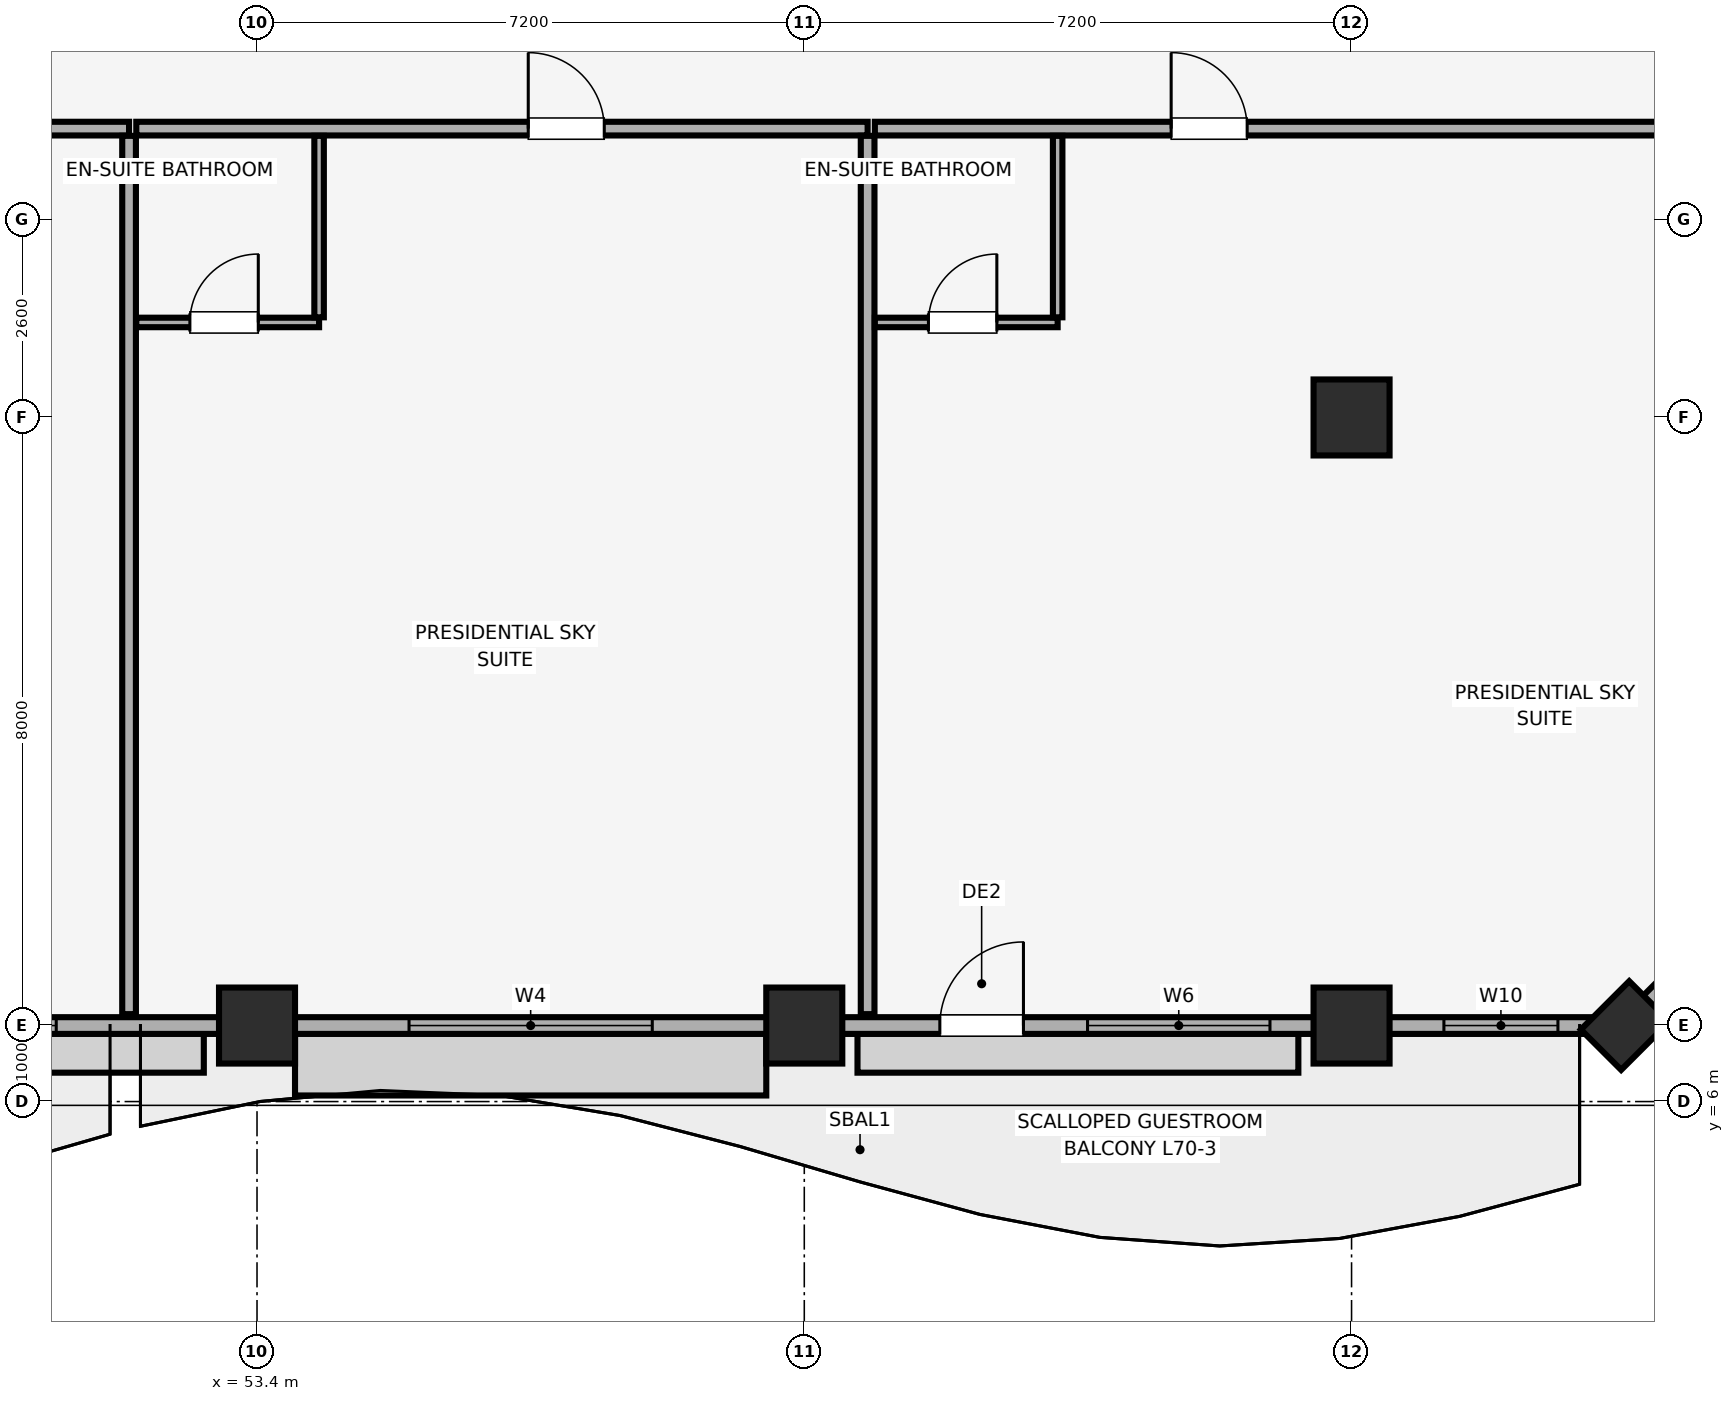
"""IFC4 building model, lengths in metres.
Left out: names, types, materials, properties, quantities, classifications, styles, units other than length and angle.
Written with IfcOpenShell. Run it as: python <this file> out.ifc"""

import sys

from ifc_helpers import new_model, si_unit, direction, frame, frame_2d, origin, origin_2d, place, context, subcontext, project, spatial, rectangle, extrude, element, fill, save


model = new_model("IFC4")
c1 = context("Model", 3, precision=1e-05, world=origin(), true_north=direction((0.0, 1.0)))
c2 = subcontext(c1, "Body", "Model", "MODEL_VIEW")
j1 = project(units=[si_unit("LENGTHUNIT", "METRE"), si_unit("PLANEANGLEUNIT", "RADIAN")], contexts=[c1])
p1 = place(None, origin())
s1 = spatial("IfcSite", under=j1, at=p1, CompositionType="ELEMENT")
p2 = place(p1, origin())
s2 = spatial("IfcBuilding", under=s1, at=p2, CompositionType="ELEMENT")
p3 = place(p2, frame((0.0, 0.0, 285.9)))
s3 = spatial("IfcBuildingStorey", under=s2, at=p3, CompositionType="ELEMENT", Elevation=285.9)
for number, where, z_axis, x_axis in (
    (1, (53.4, 7.0, 0.0), (0.0, 0.0, 1.0), (1.0, 0.0, 0.0)),
    (2, (60.6, 7.0, 0.0), (0.0, 0.0, 1.0), (1.0, 0.0, 0.0)),
    (3, (67.8, 7.0, 0.0), (0.0, 0.0, 1.0), (1.0, 0.0, 0.0)),
):
    element("IfcColumn", number, at=place(p3, frame(where, z_axis=z_axis, x_axis=x_axis)), inside=s3, PredefinedType="COLUMN", context=c2, shape_type="SweptSolid", body=[
        extrude(rectangle(XDim=1.0, YDim=1.0, at=origin_2d()), origin(), (0.0, 0.0, 1.0), 4.1),
    ])
p4 = place(p3, frame((71.4, 7.0, 0.0), z_axis=(0.0, 0.0, 1.0), x_axis=(0.707106781187, 0.707106781187, 0.0)))
e4 = element("IfcColumn", 4, at=p4, inside=s3, PredefinedType="PILASTER", context=c2, shape_type="SweptSolid", body=[
    extrude(rectangle(XDim=0.9, YDim=0.75, at=origin_2d()), origin(), (0.0, 0.0, 1.0), 4.1),
])
p5 = place(p3, frame((67.8, 15.0, 0.0), z_axis=(0.0, 0.0, 1.0), x_axis=(1.0, 0.0, 0.0)))
e5 = element("IfcColumn", 5, at=p5, inside=s3, PredefinedType="COLUMN", context=c2, shape_type="SweptSolid", body=[
    extrude(rectangle(XDim=1.0, YDim=1.0, at=origin_2d()), origin(), (0.0, 0.0, 1.0), 4.1),
])
p6 = place(p3, frame((12.6, 7.0, 0.0), z_axis=(0.0, 0.0, 1.0), x_axis=(1.0, 0.0, 0.0)))
e6 = element("IfcWall", 6, at=p6, inside=s3, PredefinedType="SOLIDWALL", context=c2, shape_type="SweptSolid", body=[
    extrude(rectangle(XDim=58.8, YDim=0.22, at=frame_2d((29.4, 0.0))), origin(), (0.0, 0.0, 1.0), 3.3),
])
p7 = place(p6, frame((7.917, 0.0, 0.0)))
e7 = element("IfcOpeningElement", 7, at=p7, cuts=e6, PredefinedType="OPENING", context=c2, shape_type="SweptSolid", body=[
    extrude(rectangle(XDim=1.1, YDim=2.15, at=frame_2d((0.55, 1.075))), frame((0.0, 0.12, 0.0), z_axis=(0.0, -1.0, 0.0), x_axis=(1.0, 0.0, 0.0)), (0.0, 0.0, 1.0), 0.24),
])
p8 = place(p6, frame((22.583, 0.0, 0.0)))
e8 = element("IfcOpeningElement", 8, at=p8, cuts=e6, PredefinedType="OPENING", context=c2, shape_type="SweptSolid", body=[
    extrude(rectangle(XDim=1.1, YDim=2.15, at=frame_2d((0.55, 1.075))), frame((0.0, 0.12, 0.0), z_axis=(0.0, -1.0, 0.0), x_axis=(1.0, 0.0, 0.0)), (0.0, 0.0, 1.0), 0.24),
])
p9 = place(p6, frame((49.783, 0.0, 0.0)))
e9 = element("IfcOpeningElement", 9, at=p9, cuts=e6, PredefinedType="OPENING", context=c2, shape_type="SweptSolid", body=[
    extrude(rectangle(XDim=1.1, YDim=2.15, at=frame_2d((0.55, 1.075))), frame((0.0, 0.12, 0.0), z_axis=(0.0, -1.0, 0.0), x_axis=(1.0, 0.0, 0.0)), (0.0, 0.0, 1.0), 0.24),
])
p10 = place(p6, frame((0.885, 0.0, 0.85)))
e10 = element("IfcOpeningElement", 10, at=p10, cuts=e6, PredefinedType="OPENING", context=c2, shape_type="SweptSolid", body=[
    extrude(rectangle(XDim=1.5, YDim=1.4, at=frame_2d((0.75, 0.7))), frame((0.0, 0.12, 0.0), z_axis=(0.0, -1.0, 0.0), x_axis=(1.0, 0.0, 0.0)), (0.0, 0.0, 1.0), 0.24),
])
p11 = place(p6, frame((4.673, 0.0, 0.85)))
e11 = element("IfcOpeningElement", 11, at=p11, cuts=e6, PredefinedType="OPENING", context=c2, shape_type="SweptSolid", body=[
    extrude(rectangle(XDim=2.4, YDim=1.5, at=frame_2d((1.2, 0.75))), frame((0.0, 0.12, 0.0), z_axis=(0.0, -1.0, 0.0), x_axis=(1.0, 0.0, 0.0)), (0.0, 0.0, 1.0), 0.24),
])
p12 = place(p6, frame((12.8, 0.0, 0.85)))
e12 = element("IfcOpeningElement", 12, at=p12, cuts=e6, PredefinedType="OPENING", context=c2, shape_type="SweptSolid", body=[
    extrude(rectangle(XDim=3.2, YDim=1.85, at=frame_2d((1.6, 0.925))), frame((0.0, 0.12, 0.0), z_axis=(0.0, -1.0, 0.0), x_axis=(1.0, 0.0, 0.0)), (0.0, 0.0, 1.0), 0.24),
])
p13 = place(p6, frame((20.298, 0.0, 0.85)))
e13 = element("IfcOpeningElement", 13, at=p13, cuts=e6, PredefinedType="OPENING", context=c2, shape_type="SweptSolid", body=[
    extrude(rectangle(XDim=1.5, YDim=1.4, at=frame_2d((0.75, 0.7))), frame((0.0, 0.12, 0.0), z_axis=(0.0, -1.0, 0.0), x_axis=(1.0, 0.0, 0.0)), (0.0, 0.0, 1.0), 0.24),
])
p14 = place(p6, frame((26.3, 0.0, 0.85)))
e14 = element("IfcOpeningElement", 14, at=p14, cuts=e6, PredefinedType="OPENING", context=c2, shape_type="SweptSolid", body=[
    extrude(rectangle(XDim=2.4, YDim=1.5, at=frame_2d((1.2, 0.75))), frame((0.0, 0.12, 0.0), z_axis=(0.0, -1.0, 0.0), x_axis=(1.0, 0.0, 0.0)), (0.0, 0.0, 1.0), 0.24),
])
p15 = place(p6, frame((30.1, 0.0, 0.85)))
e15 = element("IfcOpeningElement", 15, at=p15, cuts=e6, PredefinedType="OPENING", context=c2, shape_type="SweptSolid", body=[
    extrude(rectangle(XDim=2.4, YDim=1.5, at=frame_2d((1.2, 0.75))), frame((0.0, 0.12, 0.0), z_axis=(0.0, -1.0, 0.0), x_axis=(1.0, 0.0, 0.0)), (0.0, 0.0, 1.0), 0.24),
])
p16 = place(p6, frame((34.958, 0.0, 0.85)))
e16 = element("IfcOpeningElement", 16, at=p16, cuts=e6, PredefinedType="OPENING", context=c2, shape_type="SweptSolid", body=[
    extrude(rectangle(XDim=3.2, YDim=1.85, at=frame_2d((1.6, 0.925))), frame((0.0, 0.12, 0.0), z_axis=(0.0, -1.0, 0.0), x_axis=(1.0, 0.0, 0.0)), (0.0, 0.0, 1.0), 0.24),
])
p17 = place(p6, frame((42.8, 0.0, 0.85)))
e17 = element("IfcOpeningElement", 17, at=p17, cuts=e6, PredefinedType="OPENING", context=c2, shape_type="SweptSolid", body=[
    extrude(rectangle(XDim=3.2, YDim=1.85, at=frame_2d((1.6, 0.925))), frame((0.0, 0.12, 0.0), z_axis=(0.0, -1.0, 0.0), x_axis=(1.0, 0.0, 0.0)), (0.0, 0.0, 1.0), 0.24),
])
p18 = place(p6, frame((51.727, 0.0, 0.85)))
e18 = element("IfcOpeningElement", 18, at=p18, cuts=e6, PredefinedType="OPENING", context=c2, shape_type="SweptSolid", body=[
    extrude(rectangle(XDim=2.4, YDim=1.5, at=frame_2d((1.2, 0.75))), frame((0.0, 0.12, 0.0), z_axis=(0.0, -1.0, 0.0), x_axis=(1.0, 0.0, 0.0)), (0.0, 0.0, 1.0), 0.24),
])
p19 = place(p6, frame((56.415, 0.0, 0.85)))
e19 = element("IfcOpeningElement", 19, at=p19, cuts=e6, PredefinedType="OPENING", context=c2, shape_type="SweptSolid", body=[
    extrude(rectangle(XDim=1.5, YDim=1.4, at=frame_2d((0.75, 0.7))), frame((0.0, 0.12, 0.0), z_axis=(0.0, -1.0, 0.0), x_axis=(1.0, 0.0, 0.0)), (0.0, 0.0, 1.0), 0.24),
])
p20 = place(p3, frame((71.4, 7.0, 0.0), z_axis=(0.0, 0.0, 1.0), x_axis=(0.707106781187, 0.707106781187, 0.0)))
e20 = element("IfcWall", 20, at=p20, inside=s3, PredefinedType="SOLIDWALL", context=c2, shape_type="SweptSolid", body=[
    extrude(rectangle(XDim=5.091, YDim=0.22, at=frame_2d((2.546, 0.0))), origin(), (0.0, 0.0, 1.0), 3.3),
])
p21 = place(p20, frame((1.496, 0.0, 0.85)))
e21 = element("IfcOpeningElement", 21, at=p21, cuts=e20, PredefinedType="OPENING", context=c2, shape_type="SweptSolid", body=[
    extrude(rectangle(XDim=2.1, YDim=1.6, at=frame_2d((1.05, 0.8))), frame((0.0, 0.12, 0.0), z_axis=(0.0, -1.0, 0.0), x_axis=(1.0, 0.0, 0.0)), (0.0, 0.0, 1.0), 0.24),
])
p22 = place(p3, frame((42.095, 18.8, 0.0), z_axis=(0.0, 0.0, 1.0), x_axis=(1.0, 0.0, 0.0)))
e22 = element("IfcWall", 22, at=p22, inside=s3, PredefinedType="PARTITIONING", context=c2, shape_type="SweptSolid", body=[
    extrude(rectangle(XDim=9.622, YDim=0.18, at=frame_2d((4.811, 0.0))), origin(), (0.0, 0.0, 1.0), 4.1),
])
p23 = place(p22, frame((6.753, 0.0, 0.0)))
e23 = element("IfcOpeningElement", 23, at=p23, cuts=e22, PredefinedType="OPENING", context=c2, shape_type="SweptSolid", body=[
    extrude(rectangle(XDim=1.0, YDim=2.15, at=frame_2d((0.5, 1.075))), frame((0.0, 0.1, 0.0), z_axis=(0.0, -1.0, 0.0), x_axis=(1.0, 0.0, 0.0)), (0.0, 0.0, 1.0), 0.2),
])
p24 = place(p3, frame((51.717, 7.15, 0.0), z_axis=(0.0, 0.0, 1.0), x_axis=(0.0, 1.0, 0.0)))
e24 = element("IfcWall", 24, at=p24, inside=s3, PredefinedType="PARTITIONING", context=c2, shape_type="SweptSolid", body=[
    extrude(rectangle(XDim=11.555, YDim=0.18, at=frame_2d((5.778, 0.0))), origin(), (0.0, 0.0, 1.0), 4.1),
])
p25 = place(p3, frame((51.812, 18.8, 0.0), z_axis=(0.0, 0.0, 1.0), x_axis=(1.0, 0.0, 0.0)))
e25 = element("IfcWall", 25, at=p25, inside=s3, PredefinedType="PARTITIONING", context=c2, shape_type="SweptSolid", body=[
    extrude(rectangle(XDim=9.622, YDim=0.18, at=frame_2d((4.811, 0.0))), origin(), (0.0, 0.0, 1.0), 4.1),
])
p26 = place(p25, frame((5.157, 0.0, 0.0)))
e26 = element("IfcOpeningElement", 26, at=p26, cuts=e25, PredefinedType="OPENING", context=c2, shape_type="SweptSolid", body=[
    extrude(rectangle(XDim=1.0, YDim=2.15, at=frame_2d((0.5, 1.075))), frame((0.0, 0.1, 0.0), z_axis=(0.0, -1.0, 0.0), x_axis=(1.0, 0.0, 0.0)), (0.0, 0.0, 1.0), 0.2),
])
p27 = place(p3, frame((61.433, 7.15, 0.0), z_axis=(0.0, 0.0, 1.0), x_axis=(0.0, 1.0, 0.0)))
e27 = element("IfcWall", 27, at=p27, inside=s3, PredefinedType="PARTITIONING", context=c2, shape_type="SweptSolid", body=[
    extrude(rectangle(XDim=11.555, YDim=0.18, at=frame_2d((5.778, 0.0))), origin(), (0.0, 0.0, 1.0), 3.53),
])
p28 = place(p3, frame((51.812, 16.25, 0.0), z_axis=(0.0, 0.0, 1.0), x_axis=(1.0, 0.0, 0.0)))
e28 = element("IfcWall", 28, at=p28, inside=s3, PredefinedType="PARTITIONING", context=c2, shape_type="SweptSolid", body=[
    extrude(rectangle(XDim=2.405, YDim=0.125, at=frame_2d((1.203, 0.0))), origin(), (0.0, 0.0, 1.0), 4.1),
])
p29 = place(p28, frame((0.705, 0.0, 0.0)))
e29 = element("IfcOpeningElement", 29, at=p29, cuts=e28, PredefinedType="OPENING", context=c2, shape_type="SweptSolid", body=[
    extrude(rectangle(XDim=0.9, YDim=2.1, at=frame_2d((0.45, 1.05))), frame((0.0, 0.073, 0.0), z_axis=(0.0, -1.0, 0.0), x_axis=(1.0, 0.0, 0.0)), (0.0, 0.0, 1.0), 0.145),
])
p30 = place(p3, frame((54.217, 16.317, 0.0), z_axis=(0.0, 0.0, 1.0), x_axis=(0.0, 1.0, 0.0)))
e30 = element("IfcWall", 30, at=p30, inside=s3, PredefinedType="PARTITIONING", context=c2, shape_type="SweptSolid", body=[
    extrude(rectangle(XDim=2.388, YDim=0.125, at=frame_2d((1.194, 0.0))), origin(), (0.0, 0.0, 1.0), 4.1),
])
p31 = place(p3, frame((61.528, 18.8, 0.0), z_axis=(0.0, 0.0, 1.0), x_axis=(1.0, 0.0, 0.0)))
e31 = element("IfcWall", 31, at=p31, inside=s3, PredefinedType="PARTITIONING", context=c2, shape_type="SweptSolid", body=[
    extrude(rectangle(XDim=13.322, YDim=0.18, at=frame_2d((6.661, 0.0))), origin(), (0.0, 0.0, 1.0), 4.1),
])
p32 = place(p31, frame((3.898, 0.0, 0.0)))
e32 = element("IfcOpeningElement", 32, at=p32, cuts=e31, PredefinedType="OPENING", context=c2, shape_type="SweptSolid", body=[
    extrude(rectangle(XDim=1.0, YDim=2.15, at=frame_2d((0.5, 1.075))), frame((0.0, 0.1, 0.0), z_axis=(0.0, -1.0, 0.0), x_axis=(1.0, 0.0, 0.0)), (0.0, 0.0, 1.0), 0.2),
])
p33 = place(p3, frame((61.528, 16.25, 0.0), z_axis=(0.0, 0.0, 1.0), x_axis=(1.0, 0.0, 0.0)))
e33 = element("IfcWall", 33, at=p33, inside=s3, PredefinedType="PARTITIONING", context=c2, shape_type="SweptSolid", body=[
    extrude(rectangle(XDim=2.405, YDim=0.125, at=frame_2d((1.203, 0.0))), origin(), (0.0, 0.0, 1.0), 4.1),
])
p34 = place(p33, frame((0.705, 0.0, 0.0)))
e34 = element("IfcOpeningElement", 34, at=p34, cuts=e33, PredefinedType="OPENING", context=c2, shape_type="SweptSolid", body=[
    extrude(rectangle(XDim=0.9, YDim=2.1, at=frame_2d((0.45, 1.05))), frame((0.0, 0.073, 0.0), z_axis=(0.0, -1.0, 0.0), x_axis=(1.0, 0.0, 0.0)), (0.0, 0.0, 1.0), 0.145),
])
p35 = place(p3, frame((63.933, 16.317, 0.0), z_axis=(0.0, 0.0, 1.0), x_axis=(0.0, 1.0, 0.0)))
e35 = element("IfcWall", 35, at=p35, inside=s3, PredefinedType="PARTITIONING", context=c2, shape_type="SweptSolid", body=[
    extrude(rectangle(XDim=2.388, YDim=0.125, at=frame_2d((1.194, 0.0))), origin(), (0.0, 0.0, 1.0), 4.1),
])
p36 = place(p9, origin())
e36 = element("IfcDoor", 36, at=p36, inside=s3, OperationType="SINGLE_SWING_RIGHT", PredefinedType="DOOR", context=c2, shape_type="SweptSolid", body=[
    extrude(rectangle(XDim=1.1, YDim=2.15, at=frame_2d((0.55, 1.075))), frame((0.0, 0.025, 0.0), z_axis=(0.0, -1.0, 0.0), x_axis=(1.0, 0.0, 0.0)), (0.0, 0.0, 1.0), 0.05),
])
fill(e9, e36)
p37 = place(p16, origin())
e37 = element("IfcWindow", 37, at=p37, inside=s3, PartitioningType="SINGLE_PANEL", PredefinedType="WINDOW", context=c2, shape_type="SweptSolid", body=[
    extrude(rectangle(XDim=3.2, YDim=1.85, at=frame_2d((1.6, 0.925))), frame((0.0, 0.03, 0.0), z_axis=(0.0, -1.0, 0.0), x_axis=(1.0, 0.0, 0.0)), (0.0, 0.0, 1.0), 0.06),
])
fill(e16, e37)
p38 = place(p17, origin())
e38 = element("IfcWindow", 38, at=p38, inside=s3, PartitioningType="SINGLE_PANEL", PredefinedType="WINDOW", context=c2, shape_type="SweptSolid", body=[
    extrude(rectangle(XDim=3.2, YDim=1.85, at=frame_2d((1.6, 0.925))), frame((0.0, 0.03, 0.0), z_axis=(0.0, -1.0, 0.0), x_axis=(1.0, 0.0, 0.0)), (0.0, 0.0, 1.0), 0.06),
])
fill(e17, e38)
p39 = place(p18, origin())
e39 = element("IfcWindow", 39, at=p39, inside=s3, PartitioningType="SINGLE_PANEL", PredefinedType="WINDOW", context=c2, shape_type="SweptSolid", body=[
    extrude(rectangle(XDim=2.4, YDim=1.5, at=frame_2d((1.2, 0.75))), frame((0.0, 0.03, 0.0), z_axis=(0.0, -1.0, 0.0), x_axis=(1.0, 0.0, 0.0)), (0.0, 0.0, 1.0), 0.06),
])
fill(e18, e39)
p40 = place(p19, origin())
e40 = element("IfcWindow", 40, at=p40, inside=s3, PartitioningType="SINGLE_PANEL", PredefinedType="WINDOW", context=c2, shape_type="SweptSolid", body=[
    extrude(rectangle(XDim=1.5, YDim=1.4, at=frame_2d((0.75, 0.7))), frame((0.0, 0.03, 0.0), z_axis=(0.0, -1.0, 0.0), x_axis=(1.0, 0.0, 0.0)), (0.0, 0.0, 1.0), 0.06),
])
fill(e19, e40)
p41 = place(p26, origin())
e41 = element("IfcDoor", 41, at=p41, inside=s3, OperationType="SINGLE_SWING_LEFT", PredefinedType="DOOR", context=c2, shape_type="SweptSolid", body=[
    extrude(rectangle(XDim=1.0, YDim=2.15, at=frame_2d((0.5, 1.075))), frame((0.0, 0.025, 0.0), z_axis=(0.0, -1.0, 0.0), x_axis=(1.0, 0.0, 0.0)), (0.0, 0.0, 1.0), 0.05),
])
fill(e26, e41)
p42 = place(p29, origin())
e42 = element("IfcDoor", 42, at=p42, inside=s3, OperationType="SINGLE_SWING_RIGHT", PredefinedType="DOOR", context=c2, shape_type="SweptSolid", body=[
    extrude(rectangle(XDim=0.9, YDim=2.1, at=frame_2d((0.45, 1.05))), frame((0.0, 0.025, 0.0), z_axis=(0.0, -1.0, 0.0), x_axis=(1.0, 0.0, 0.0)), (0.0, 0.0, 1.0), 0.05),
])
fill(e29, e42)
p43 = place(p32, origin())
e43 = element("IfcDoor", 43, at=p43, inside=s3, OperationType="SINGLE_SWING_LEFT", PredefinedType="DOOR", context=c2, shape_type="SweptSolid", body=[
    extrude(rectangle(XDim=1.0, YDim=2.15, at=frame_2d((0.5, 1.075))), frame((0.0, 0.025, 0.0), z_axis=(0.0, -1.0, 0.0), x_axis=(1.0, 0.0, 0.0)), (0.0, 0.0, 1.0), 0.05),
])
fill(e32, e43)
p44 = place(p34, origin())
e44 = element("IfcDoor", 44, at=p44, inside=s3, OperationType="SINGLE_SWING_RIGHT", PredefinedType="DOOR", context=c2, shape_type="SweptSolid", body=[
    extrude(rectangle(XDim=0.9, YDim=2.1, at=frame_2d((0.45, 1.05))), frame((0.0, 0.025, 0.0), z_axis=(0.0, -1.0, 0.0), x_axis=(1.0, 0.0, 0.0)), (0.0, 0.0, 1.0), 0.05),
])
fill(e34, e44)
save(model, sys.argv[1])
